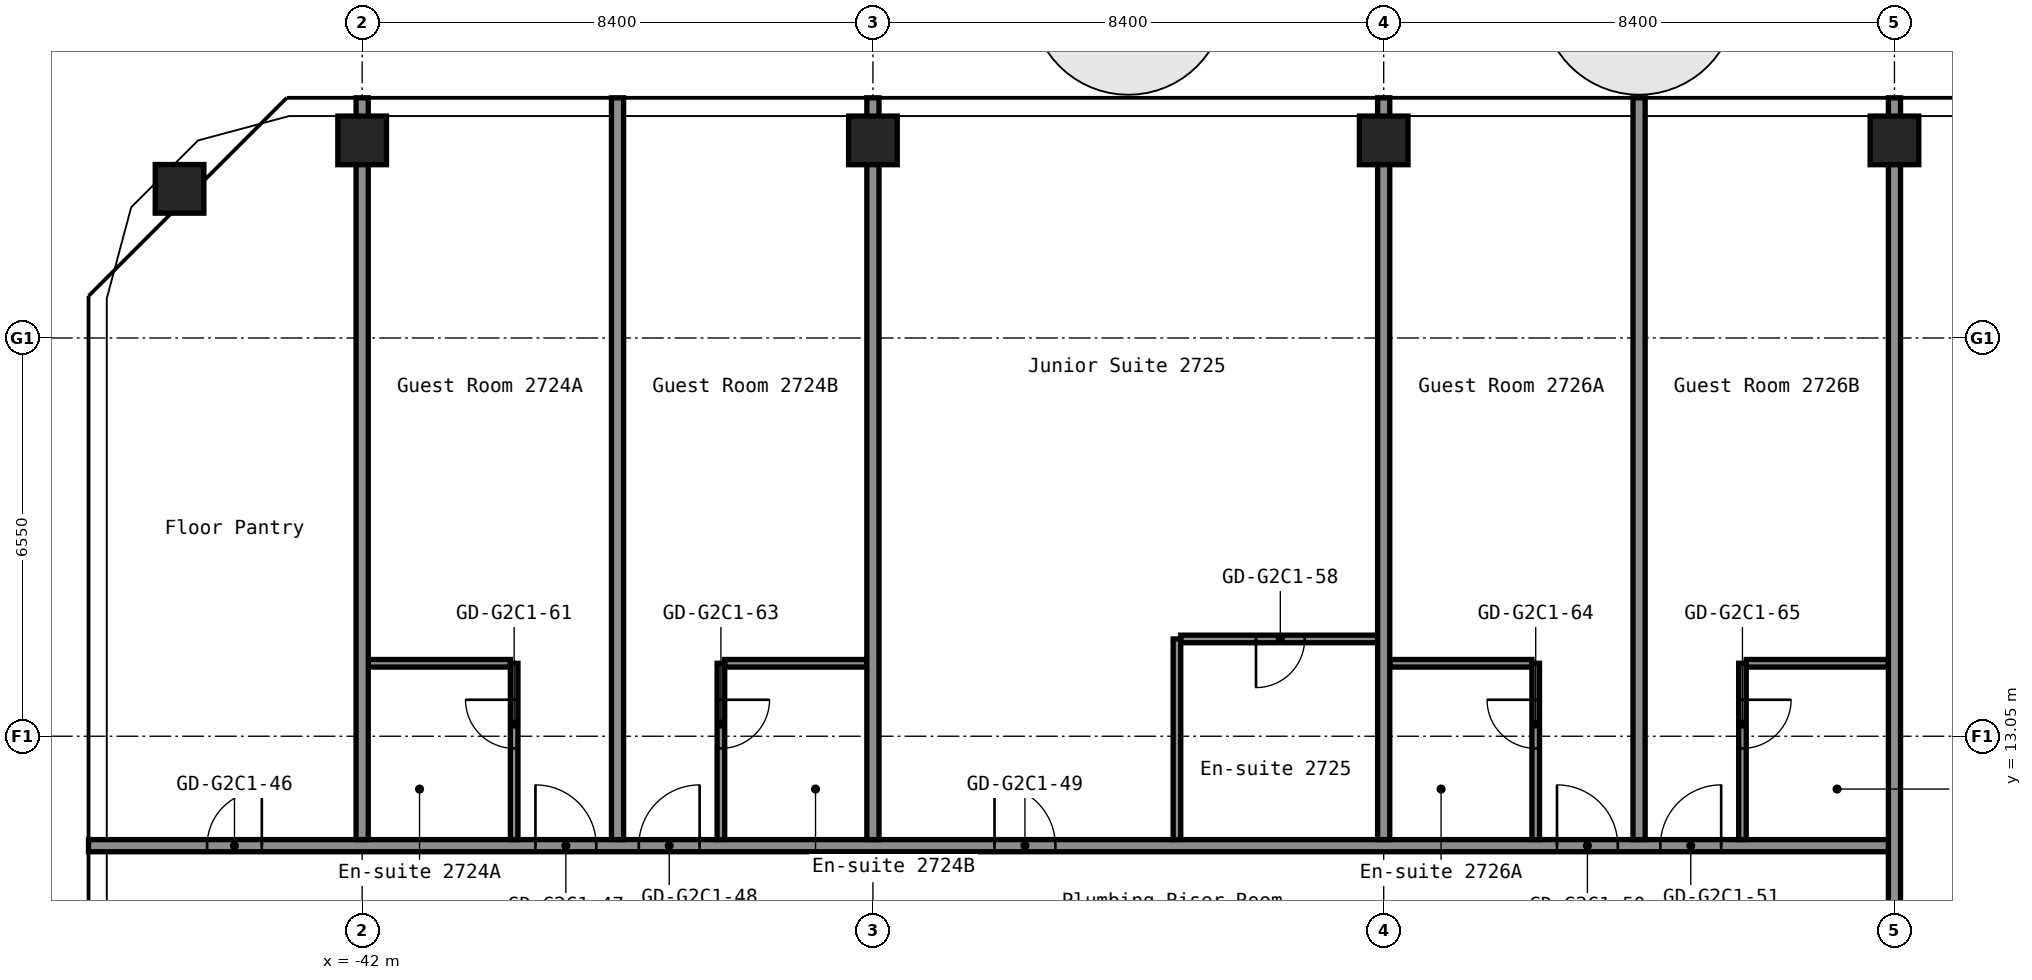
"""IFC4 building model, lengths in metres.
Left out: names, types, materials, properties, quantities, classifications, styles, units other than length and angle.
Written with IfcOpenShell. Run it as: python <this file> out.ifc"""

import sys

from ifc_helpers import new_model, si_unit, direction, frame, frame_2d, origin, origin_2d, place, context, subcontext, project, spatial, rectangle, hollow_rectangle, extrude, element, fill, save


model = new_model("IFC4")
c1 = context("Model", 3, precision=1e-05, world=origin(), true_north=direction((0.0, 1.0)))
c2 = subcontext(c1, "Body", "Model", "MODEL_VIEW")
j1 = project(units=[si_unit("LENGTHUNIT", "METRE"), si_unit("PLANEANGLEUNIT", "RADIAN")], contexts=[c1])
p1 = place(None, origin())
s1 = spatial("IfcSite", under=j1, at=p1, CompositionType="ELEMENT")
p2 = place(p1, origin())
s2 = spatial("IfcBuilding", under=s1, at=p2, CompositionType="ELEMENT")
p3 = place(p2, frame((0.0, 0.0, 97.8)))
s3 = spatial("IfcBuildingStorey", under=s2, at=p3, CompositionType="ELEMENT", Elevation=97.8)
for number, where, z_axis, x_axis in (
    (1, (-45.003, 22.053, 0.0), (0.0, 0.0, 1.0), (1.0, 0.0, 0.0)),
    (2, (-42.0, 22.85, 0.0), (0.0, 0.0, 1.0), (1.0, 0.0, 0.0)),
    (3, (-33.6, 22.85, 0.0), (0.0, 0.0, 1.0), (1.0, 0.0, 0.0)),
    (4, (-25.2, 22.85, 0.0), (0.0, 0.0, 1.0), (1.0, 0.0, 0.0)),
    (5, (-16.8, 22.85, 0.0), (0.0, 0.0, 1.0), (1.0, 0.0, 0.0)),
):
    element("IfcColumn", number, at=place(p3, frame(where, z_axis=z_axis, x_axis=x_axis)), inside=s3, PredefinedType="COLUMN", context=c2, shape_type="SweptSolid", body=[
        extrude(hollow_rectangle(XDim=0.8, YDim=0.8, WallThickness=0.032, at=origin_2d()), origin(), (0.0, 0.0, 1.0), 2.8),
    ])
p4 = place(p3, frame((-46.5, 11.25, 0.0), z_axis=(0.0, 0.0, 1.0), x_axis=(1.0, 0.0, 0.0)))
e6 = element("IfcWall", 6, at=p4, inside=s3, PredefinedType="PARTITIONING", context=c2, shape_type="SweptSolid", body=[
    extrude(rectangle(XDim=29.7, YDim=0.2, at=frame_2d((14.85, 0.0))), origin(), (0.0, 0.0, 1.0), 2.8),
])
p5 = place(p4, frame((1.95, 0.0, 0.0)))
e7 = element("IfcOpeningElement", 7, at=p5, cuts=e6, PredefinedType="OPENING", context=c2, shape_type="SweptSolid", body=[
    extrude(rectangle(XDim=0.9, YDim=2.1, at=frame_2d((0.45, 1.05))), frame((0.0, 0.11, 0.0), z_axis=(0.0, -1.0, 0.0), x_axis=(1.0, 0.0, 0.0)), (0.0, 0.0, 1.0), 0.22),
])
p6 = place(p4, frame((7.35, 0.0, 0.0)))
e8 = element("IfcOpeningElement", 8, at=p6, cuts=e6, PredefinedType="OPENING", context=c2, shape_type="SweptSolid", body=[
    extrude(rectangle(XDim=1.0, YDim=2.1, at=frame_2d((0.5, 1.05))), frame((0.0, 0.11, 0.0), z_axis=(0.0, -1.0, 0.0), x_axis=(1.0, 0.0, 0.0)), (0.0, 0.0, 1.0), 0.22),
])
p7 = place(p4, frame((9.05, 0.0, 0.0)))
e9 = element("IfcOpeningElement", 9, at=p7, cuts=e6, PredefinedType="OPENING", context=c2, shape_type="SweptSolid", body=[
    extrude(rectangle(XDim=1.0, YDim=2.1, at=frame_2d((0.5, 1.05))), frame((0.0, 0.11, 0.0), z_axis=(0.0, -1.0, 0.0), x_axis=(1.0, 0.0, 0.0)), (0.0, 0.0, 1.0), 0.22),
])
p8 = place(p4, frame((14.9, 0.0, 0.0)))
e10 = element("IfcOpeningElement", 10, at=p8, cuts=e6, PredefinedType="OPENING", context=c2, shape_type="SweptSolid", body=[
    extrude(rectangle(XDim=1.0, YDim=2.1, at=frame_2d((0.5, 1.05))), frame((0.0, 0.11, 0.0), z_axis=(0.0, -1.0, 0.0), x_axis=(1.0, 0.0, 0.0)), (0.0, 0.0, 1.0), 0.22),
])
p9 = place(p4, frame((24.15, 0.0, 0.0)))
e11 = element("IfcOpeningElement", 11, at=p9, cuts=e6, PredefinedType="OPENING", context=c2, shape_type="SweptSolid", body=[
    extrude(rectangle(XDim=1.0, YDim=2.1, at=frame_2d((0.5, 1.05))), frame((0.0, 0.11, 0.0), z_axis=(0.0, -1.0, 0.0), x_axis=(1.0, 0.0, 0.0)), (0.0, 0.0, 1.0), 0.22),
])
p10 = place(p4, frame((25.85, 0.0, 0.0)))
e12 = element("IfcOpeningElement", 12, at=p10, cuts=e6, PredefinedType="OPENING", context=c2, shape_type="SweptSolid", body=[
    extrude(rectangle(XDim=1.0, YDim=2.1, at=frame_2d((0.5, 1.05))), frame((0.0, 0.11, 0.0), z_axis=(0.0, -1.0, 0.0), x_axis=(1.0, 0.0, 0.0)), (0.0, 0.0, 1.0), 0.22),
])
p11 = place(p3, frame((-41.9, 14.25, 0.0), z_axis=(0.0, 0.0, 1.0), x_axis=(1.0, 0.0, 0.0)))
e13 = element("IfcWall", 13, at=p11, inside=s3, PredefinedType="PARTITIONING", context=c2, shape_type="SweptSolid", body=[
    extrude(rectangle(XDim=2.337, YDim=0.125, at=frame_2d((1.169, 0.0))), origin(), (0.0, 0.0, 1.0), 2.8),
])
for number, where, z_axis, x_axis in (
    (14, (-36.038, 14.25, 0.0), (0.0, 0.0, 1.0), (1.0, 0.0, 0.0)),
    (15, (-25.1, 14.25, 0.0), (0.0, 0.0, 1.0), (1.0, 0.0, 0.0)),
    (16, (-19.238, 14.25, 0.0), (0.0, 0.0, 1.0), (1.0, 0.0, 0.0)),
):
    element("IfcWall", number, at=place(p3, frame(where, z_axis=z_axis, x_axis=x_axis)), inside=s3, PredefinedType="PARTITIONING", context=c2, shape_type="SweptSolid", body=[
        extrude(rectangle(XDim=2.338, YDim=0.125, at=frame_2d((1.169, 0.0))), origin(), (0.0, 0.0, 1.0), 2.8),
    ])
p12 = place(p3, frame((-28.538, 14.65, 0.0), z_axis=(0.0, 0.0, 1.0), x_axis=(1.0, 0.0, 0.0)))
e17 = element("IfcWall", 17, at=p12, inside=s3, PredefinedType="PARTITIONING", context=c2, shape_type="SweptSolid", body=[
    extrude(rectangle(XDim=3.238, YDim=0.125, at=frame_2d((1.619, 0.0))), origin(), (0.0, 0.0, 1.0), 2.8),
])
p13 = place(p12, frame((1.238, 0.0, 0.0)))
e18 = element("IfcOpeningElement", 18, at=p13, cuts=e17, PredefinedType="OPENING", context=c2, shape_type="SweptSolid", body=[
    extrude(rectangle(XDim=0.8, YDim=2.1, at=frame_2d((0.4, 1.05))), frame((0.0, 0.073, 0.0), z_axis=(0.0, -1.0, 0.0), x_axis=(1.0, 0.0, 0.0)), (0.0, 0.0, 1.0), 0.145),
])
p14 = place(p3, frame((-42.0, 11.35, 0.0), z_axis=(0.0, 0.0, 1.0), x_axis=(0.0, 1.0, 0.0)))
e19 = element("IfcWall", 19, at=p14, inside=s3, PredefinedType="PARTITIONING", context=c2, shape_type="SweptSolid", body=[
    extrude(rectangle(XDim=12.2, YDim=0.2, at=frame_2d((6.1, 0.0))), origin(), (0.0, 0.0, 1.0), 2.8),
])
p15 = place(p3, frame((-39.5, 11.35, 0.0), z_axis=(0.0, 0.0, 1.0), x_axis=(0.0, 1.0, 0.0)))
e20 = element("IfcWall", 20, at=p15, inside=s3, PredefinedType="PARTITIONING", context=c2, shape_type="SweptSolid", body=[
    extrude(rectangle(XDim=2.9, YDim=0.125, at=frame_2d((1.45, 0.0))), origin(), (0.0, 0.0, 1.0), 2.8),
])
p16 = place(p15, frame((1.5, 0.0, 0.0)))
e21 = element("IfcOpeningElement", 21, at=p16, cuts=e20, PredefinedType="OPENING", context=c2, shape_type="SweptSolid", body=[
    extrude(rectangle(XDim=0.8, YDim=2.1, at=frame_2d((0.4, 1.05))), frame((0.0, 0.073, 0.0), z_axis=(0.0, -1.0, 0.0), x_axis=(1.0, 0.0, 0.0)), (0.0, 0.0, 1.0), 0.145),
])
p17 = place(p3, frame((-37.8, 11.35, 0.0), z_axis=(0.0, 0.0, 1.0), x_axis=(0.0, 1.0, 0.0)))
e22 = element("IfcWall", 22, at=p17, inside=s3, PredefinedType="PARTITIONING", context=c2, shape_type="SweptSolid", body=[
    extrude(rectangle(XDim=12.2, YDim=0.2, at=frame_2d((6.1, 0.0))), origin(), (0.0, 0.0, 1.0), 2.8),
])
p18 = place(p3, frame((-36.1, 11.35, 0.0), z_axis=(0.0, 0.0, 1.0), x_axis=(0.0, 1.0, 0.0)))
e23 = element("IfcWall", 23, at=p18, inside=s3, PredefinedType="PARTITIONING", context=c2, shape_type="SweptSolid", body=[
    extrude(rectangle(XDim=2.9, YDim=0.125, at=frame_2d((1.45, 0.0))), origin(), (0.0, 0.0, 1.0), 2.8),
])
p19 = place(p18, frame((1.5, 0.0, 0.0)))
e24 = element("IfcOpeningElement", 24, at=p19, cuts=e23, PredefinedType="OPENING", context=c2, shape_type="SweptSolid", body=[
    extrude(rectangle(XDim=0.8, YDim=2.1, at=frame_2d((0.4, 1.05))), frame((0.0, 0.073, 0.0), z_axis=(0.0, -1.0, 0.0), x_axis=(1.0, 0.0, 0.0)), (0.0, 0.0, 1.0), 0.145),
])
p20 = place(p3, frame((-33.6, 11.35, 0.0), z_axis=(0.0, 0.0, 1.0), x_axis=(0.0, 1.0, 0.0)))
e25 = element("IfcWall", 25, at=p20, inside=s3, PredefinedType="PARTITIONING", context=c2, shape_type="SweptSolid", body=[
    extrude(rectangle(XDim=12.2, YDim=0.2, at=frame_2d((6.1, 0.0))), origin(), (0.0, 0.0, 1.0), 2.8),
])
p21 = place(p3, frame((-28.6, 11.35, 0.0), z_axis=(0.0, 0.0, 1.0), x_axis=(0.0, 1.0, 0.0)))
e26 = element("IfcWall", 26, at=p21, inside=s3, PredefinedType="PARTITIONING", context=c2, shape_type="SweptSolid", body=[
    extrude(rectangle(XDim=3.3, YDim=0.125, at=frame_2d((1.65, 0.0))), origin(), (0.0, 0.0, 1.0), 2.8),
])
p22 = place(p3, frame((-25.2, 11.35, 0.0), z_axis=(0.0, 0.0, 1.0), x_axis=(0.0, 1.0, 0.0)))
e27 = element("IfcWall", 27, at=p22, inside=s3, PredefinedType="PARTITIONING", context=c2, shape_type="SweptSolid", body=[
    extrude(rectangle(XDim=12.2, YDim=0.2, at=frame_2d((6.1, 0.0))), origin(), (0.0, 0.0, 1.0), 2.8),
])
p23 = place(p3, frame((-22.7, 11.35, 0.0), z_axis=(0.0, 0.0, 1.0), x_axis=(0.0, 1.0, 0.0)))
e28 = element("IfcWall", 28, at=p23, inside=s3, PredefinedType="PARTITIONING", context=c2, shape_type="SweptSolid", body=[
    extrude(rectangle(XDim=2.9, YDim=0.125, at=frame_2d((1.45, 0.0))), origin(), (0.0, 0.0, 1.0), 2.8),
])
p24 = place(p23, frame((1.5, 0.0, 0.0)))
e29 = element("IfcOpeningElement", 29, at=p24, cuts=e28, PredefinedType="OPENING", context=c2, shape_type="SweptSolid", body=[
    extrude(rectangle(XDim=0.8, YDim=2.1, at=frame_2d((0.4, 1.05))), frame((0.0, 0.073, 0.0), z_axis=(0.0, -1.0, 0.0), x_axis=(1.0, 0.0, 0.0)), (0.0, 0.0, 1.0), 0.145),
])
p25 = place(p3, frame((-21.0, 11.35, 0.0), z_axis=(0.0, 0.0, 1.0), x_axis=(0.0, 1.0, 0.0)))
e30 = element("IfcWall", 30, at=p25, inside=s3, PredefinedType="PARTITIONING", context=c2, shape_type="SweptSolid", body=[
    extrude(rectangle(XDim=12.2, YDim=0.2, at=frame_2d((6.1, 0.0))), origin(), (0.0, 0.0, 1.0), 2.8),
])
p26 = place(p3, frame((-19.3, 11.35, 0.0), z_axis=(0.0, 0.0, 1.0), x_axis=(0.0, 1.0, 0.0)))
e31 = element("IfcWall", 31, at=p26, inside=s3, PredefinedType="PARTITIONING", context=c2, shape_type="SweptSolid", body=[
    extrude(rectangle(XDim=2.9, YDim=0.125, at=frame_2d((1.45, 0.0))), origin(), (0.0, 0.0, 1.0), 2.8),
])
p27 = place(p26, frame((1.5, 0.0, 0.0)))
e32 = element("IfcOpeningElement", 32, at=p27, cuts=e31, PredefinedType="OPENING", context=c2, shape_type="SweptSolid", body=[
    extrude(rectangle(XDim=0.8, YDim=2.1, at=frame_2d((0.4, 1.05))), frame((0.0, 0.073, 0.0), z_axis=(0.0, -1.0, 0.0), x_axis=(1.0, 0.0, 0.0)), (0.0, 0.0, 1.0), 0.145),
])
p28 = place(p3, frame((-16.8, 10.19, 0.0), z_axis=(0.0, 0.0, 1.0), x_axis=(0.0, 1.0, 0.0)))
e33 = element("IfcWall", 33, at=p28, inside=s3, PredefinedType="PARTITIONING", context=c2, shape_type="SweptSolid", body=[
    extrude(rectangle(XDim=13.36, YDim=0.2, at=frame_2d((6.68, 0.0))), origin(), (0.0, 0.0, 1.0), 2.8),
])
p29 = place(p5, origin())
e34 = element("IfcDoor", 34, at=p29, inside=s3, OperationType="SINGLE_SWING_LEFT", PredefinedType="DOOR", context=c2, shape_type="SweptSolid", body=[
    extrude(rectangle(XDim=0.9, YDim=2.1, at=frame_2d((0.45, 1.05))), frame((0.0, 0.025, 0.0), z_axis=(0.0, -1.0, 0.0), x_axis=(1.0, 0.0, 0.0)), (0.0, 0.0, 1.0), 0.05),
])
fill(e7, e34)
p30 = place(p6, origin())
e35 = element("IfcDoor", 35, at=p30, inside=s3, OperationType="SINGLE_SWING_RIGHT", PredefinedType="DOOR", context=c2, shape_type="SweptSolid", body=[
    extrude(rectangle(XDim=1.0, YDim=2.1, at=frame_2d((0.5, 1.05))), frame((0.0, 0.025, 0.0), z_axis=(0.0, -1.0, 0.0), x_axis=(1.0, 0.0, 0.0)), (0.0, 0.0, 1.0), 0.05),
])
fill(e8, e35)
p31 = place(p7, origin())
e36 = element("IfcDoor", 36, at=p31, inside=s3, OperationType="SINGLE_SWING_LEFT", PredefinedType="DOOR", context=c2, shape_type="SweptSolid", body=[
    extrude(rectangle(XDim=1.0, YDim=2.1, at=frame_2d((0.5, 1.05))), frame((0.0, 0.025, 0.0), z_axis=(0.0, -1.0, 0.0), x_axis=(1.0, 0.0, 0.0)), (0.0, 0.0, 1.0), 0.05),
])
fill(e9, e36)
p32 = place(p8, origin())
e37 = element("IfcDoor", 37, at=p32, inside=s3, OperationType="SINGLE_SWING_RIGHT", PredefinedType="DOOR", context=c2, shape_type="SweptSolid", body=[
    extrude(rectangle(XDim=1.0, YDim=2.1, at=frame_2d((0.5, 1.05))), frame((0.0, 0.025, 0.0), z_axis=(0.0, -1.0, 0.0), x_axis=(1.0, 0.0, 0.0)), (0.0, 0.0, 1.0), 0.05),
])
fill(e10, e37)
p33 = place(p9, origin())
e38 = element("IfcDoor", 38, at=p33, inside=s3, OperationType="SINGLE_SWING_RIGHT", PredefinedType="DOOR", context=c2, shape_type="SweptSolid", body=[
    extrude(rectangle(XDim=1.0, YDim=2.1, at=frame_2d((0.5, 1.05))), frame((0.0, 0.025, 0.0), z_axis=(0.0, -1.0, 0.0), x_axis=(1.0, 0.0, 0.0)), (0.0, 0.0, 1.0), 0.05),
])
fill(e11, e38)
p34 = place(p10, origin())
e39 = element("IfcDoor", 39, at=p34, inside=s3, OperationType="SINGLE_SWING_LEFT", PredefinedType="DOOR", context=c2, shape_type="SweptSolid", body=[
    extrude(rectangle(XDim=1.0, YDim=2.1, at=frame_2d((0.5, 1.05))), frame((0.0, 0.025, 0.0), z_axis=(0.0, -1.0, 0.0), x_axis=(1.0, 0.0, 0.0)), (0.0, 0.0, 1.0), 0.05),
])
fill(e12, e39)
p35 = place(p13, origin())
e40 = element("IfcDoor", 40, at=p35, inside=s3, OperationType="SINGLE_SWING_LEFT", PredefinedType="DOOR", context=c2, shape_type="SweptSolid", body=[
    extrude(rectangle(XDim=0.8, YDim=2.1, at=frame_2d((0.4, 1.05))), frame((0.0, 0.025, 0.0), z_axis=(0.0, -1.0, 0.0), x_axis=(1.0, 0.0, 0.0)), (0.0, 0.0, 1.0), 0.05),
])
fill(e18, e40)
p36 = place(p16, origin())
e41 = element("IfcDoor", 41, at=p36, inside=s3, OperationType="SINGLE_SWING_LEFT", PredefinedType="DOOR", context=c2, shape_type="SweptSolid", body=[
    extrude(rectangle(XDim=0.8, YDim=2.1, at=frame_2d((0.4, 1.05))), frame((0.0, 0.025, 0.0), z_axis=(0.0, -1.0, 0.0), x_axis=(1.0, 0.0, 0.0)), (0.0, 0.0, 1.0), 0.05),
])
fill(e21, e41)
p37 = place(p19, origin())
e42 = element("IfcDoor", 42, at=p37, inside=s3, OperationType="SINGLE_SWING_RIGHT", PredefinedType="DOOR", context=c2, shape_type="SweptSolid", body=[
    extrude(rectangle(XDim=0.8, YDim=2.1, at=frame_2d((0.4, 1.05))), frame((0.0, 0.025, 0.0), z_axis=(0.0, -1.0, 0.0), x_axis=(1.0, 0.0, 0.0)), (0.0, 0.0, 1.0), 0.05),
])
fill(e24, e42)
p38 = place(p24, origin())
e43 = element("IfcDoor", 43, at=p38, inside=s3, OperationType="SINGLE_SWING_LEFT", PredefinedType="DOOR", context=c2, shape_type="SweptSolid", body=[
    extrude(rectangle(XDim=0.8, YDim=2.1, at=frame_2d((0.4, 1.05))), frame((0.0, 0.025, 0.0), z_axis=(0.0, -1.0, 0.0), x_axis=(1.0, 0.0, 0.0)), (0.0, 0.0, 1.0), 0.05),
])
fill(e29, e43)
p39 = place(p27, origin())
e44 = element("IfcDoor", 44, at=p39, inside=s3, OperationType="SINGLE_SWING_RIGHT", PredefinedType="DOOR", context=c2, shape_type="SweptSolid", body=[
    extrude(rectangle(XDim=0.8, YDim=2.1, at=frame_2d((0.4, 1.05))), frame((0.0, 0.025, 0.0), z_axis=(0.0, -1.0, 0.0), x_axis=(1.0, 0.0, 0.0)), (0.0, 0.0, 1.0), 0.05),
])
fill(e32, e44)
save(model, sys.argv[1])
